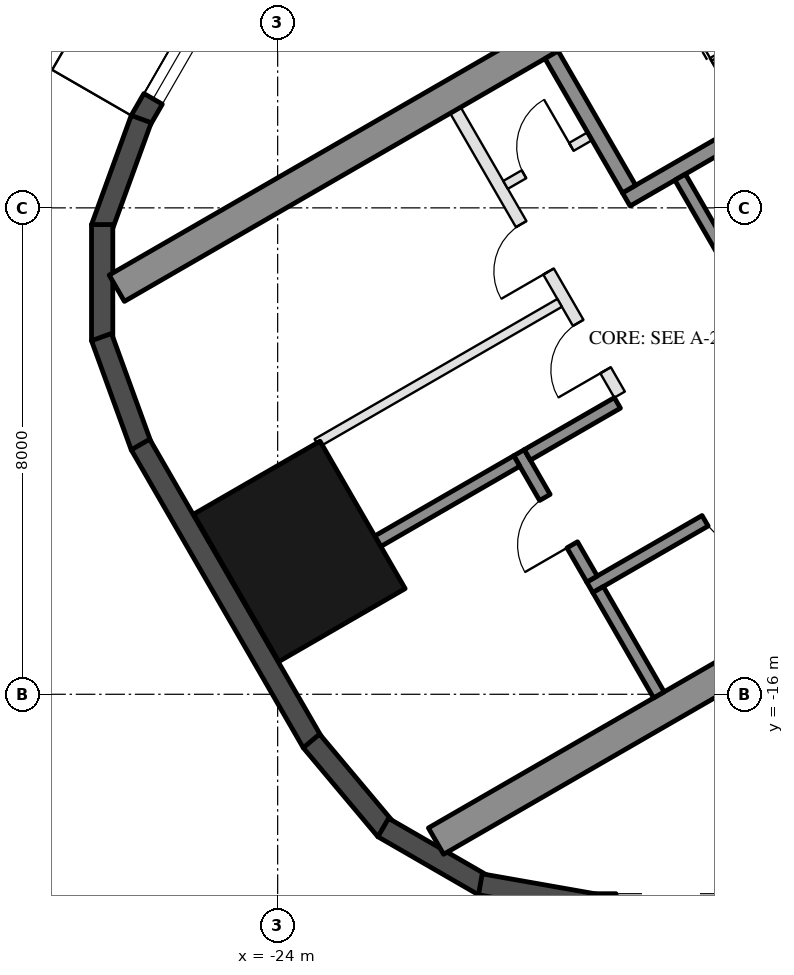
"""IFC4 building model, lengths in metres.
Left out: names, types, materials, properties, quantities, classifications, styles, units other than length and angle.
Written with IfcOpenShell. Run it as: python <this file> out.ifc"""

import sys

from ifc_helpers import new_model, si_unit, direction, frame, frame_2d, origin, origin_2d, place, context, subcontext, project, spatial, rectangle, hollow_rectangle, extrude, element, fill, save


model = new_model("IFC4")
c1 = context("Model", 3, precision=1e-05, world=origin(), true_north=direction((0.0, 1.0)))
c2 = subcontext(c1, "Body", "Model", "MODEL_VIEW")
j1 = project(units=[si_unit("LENGTHUNIT", "METRE"), si_unit("PLANEANGLEUNIT", "RADIAN")], contexts=[c1])
p1 = place(None, origin())
s1 = spatial("IfcSite", under=j1, at=p1, CompositionType="ELEMENT")
p2 = place(p1, origin())
s2 = spatial("IfcBuilding", under=s1, at=p2, CompositionType="ELEMENT")
p3 = place(p2, frame((0.0, 0.0, 87.2)))
s3 = spatial("IfcBuildingStorey", under=s2, at=p3, CompositionType="ELEMENT", Elevation=87.2)
p4 = place(p3, frame((-23.643, -13.65, 0.0), z_axis=(0.0, 0.0, 1.0), x_axis=(-0.5, 0.866025403784, 0.0)))
e1 = element("IfcColumn", 1, at=p4, inside=s3, PredefinedType="COLUMN", context=c2, shape_type="SweptSolid", body=[
    extrude(hollow_rectangle(XDim=2.8, YDim=2.4, WallThickness=0.07, at=origin_2d()), origin(), (0.0, 0.0, 1.0), 3.7),
])
p5 = place(p3, frame((-24.299, -3.176, 0.0), z_axis=(0.0, 0.0, 1.0), x_axis=(-0.500028278809, -0.866009076391, 0.0)))
e2 = element("IfcWall", 2, at=p5, inside=s3, PredefinedType="SOLIDWALL", context=c2, shape_type="SweptSolid", body=[
    extrude(rectangle(XDim=3.916, YDim=0.35, at=frame_2d((1.958, 0.0))), origin(), (0.0, 0.0, 1.0), 3.55),
])
p6 = place(p5, frame((1.7, 0.0, 0.3)))
e3 = element("IfcOpeningElement", 3, at=p6, cuts=e2, PredefinedType="OPENING", context=c2, shape_type="SweptSolid", body=[
    extrude(rectangle(XDim=1.8, YDim=2.65, at=frame_2d((0.9, 1.325))), frame((0.0, 0.185, 0.0), z_axis=(0.0, -1.0, 0.0), x_axis=(1.0, 0.0, 0.0)), (0.0, 0.0, 1.0), 0.37),
])
for number, where, z_axis, x_axis in (
    (4, (-26.244, -6.54, 0.0), (0.0, 0.0, 1.0), (-0.342, -0.94, 0.0)),
    (5, (-26.886, -8.275, 0.0), (0.0, 0.0, 1.0), (0.0, -1.0, 0.0)),
    (6, (-26.897, -10.125, 0.0), (0.0, 0.0, 1.0), (0.342, -0.94, 0.0)),
):
    element("IfcWall", number, at=place(p3, frame(where, z_axis=z_axis, x_axis=x_axis)), inside=s3, PredefinedType="SOLIDWALL", context=c2, shape_type="SweptSolid", body=[
        extrude(rectangle(XDim=1.91, YDim=0.35, at=frame_2d((0.955, 0.0))), origin(), (0.0, 0.0, 1.0), 3.55),
    ])
p7 = place(p3, frame((-26.257, -11.893, 0.0), z_axis=(0.0, 0.0, 1.0), x_axis=(0.500018773155, -0.866014564827, 0.0)))
e7 = element("IfcWall", 7, at=p7, inside=s3, PredefinedType="SOLIDWALL", context=c2, shape_type="SweptSolid", body=[
    extrude(rectangle(XDim=5.658, YDim=0.35, at=frame_2d((2.829, 0.0))), origin(), (0.0, 0.0, 1.0), 3.55),
])
for number, where, z_axis, x_axis in (
    (8, (-23.445, -16.768, 0.0), (0.0, 0.0, 1.0), (0.643, -0.766, 0.0)),
    (9, (-22.264, -18.192, 0.0), (0.0, 0.0, 1.0), (0.866, -0.5, 0.0)),
):
    element("IfcWall", number, at=place(p3, frame(where, z_axis=z_axis, x_axis=x_axis)), inside=s3, PredefinedType="SOLIDWALL", context=c2, shape_type="SweptSolid", body=[
        extrude(rectangle(XDim=1.91, YDim=0.35, at=frame_2d((0.955, 0.0))), origin(), (0.0, 0.0, 1.0), 3.55),
    ])
p8 = place(p3, frame((-20.667, -19.126, 0.0), z_axis=(0.0, 0.0, 1.0), x_axis=(0.984798995425, -0.173697837091, 0.0)))
e10 = element("IfcWall", 10, at=p8, inside=s3, PredefinedType="SOLIDWALL", context=c2, shape_type="SweptSolid", body=[
    extrude(rectangle(XDim=1.91, YDim=0.35, at=frame_2d((0.955, 0.0))), origin(), (0.0, 0.0, 1.0), 3.55),
])
p9 = place(p3, frame((-18.816, -19.455, 0.0), z_axis=(0.0, 0.0, 1.0), x_axis=(1.0, 0.0, 0.0)))
e11 = element("IfcWall", 11, at=p9, inside=s3, PredefinedType="SOLIDWALL", context=c2, shape_type="SweptSolid", body=[
    extrude(rectangle(XDim=11.816, YDim=0.35, at=frame_2d((5.908, 0.0))), origin(), (0.0, 0.0, 1.0), 3.55),
])
p10 = place(p9, frame((0.381, 0.0, 0.3)))
e12 = element("IfcOpeningElement", 12, at=p10, cuts=e11, PredefinedType="OPENING", context=c2, shape_type="SweptSolid", body=[
    extrude(rectangle(XDim=1.8, YDim=2.65, at=frame_2d((0.9, 1.325))), frame((0.0, 0.185, 0.0), z_axis=(0.0, -1.0, 0.0), x_axis=(1.0, 0.0, 0.0)), (0.0, 0.0, 1.0), 0.37),
])
p11 = place(p9, frame((7.716, 0.0, 0.0)))
e13 = element("IfcOpeningElement", 13, at=p11, cuts=e11, PredefinedType="OPENING", context=c2, shape_type="SweptSolid", body=[
    extrude(rectangle(XDim=2.4, YDim=2.4, at=frame_2d((1.2, 1.2))), frame((0.0, 0.185, 0.0), z_axis=(0.0, -1.0, 0.0), x_axis=(1.0, 0.0, 0.0)), (0.0, 0.0, 1.0), 0.37),
])
p12 = place(p9, frame((3.816, 0.0, 0.3)))
e14 = element("IfcOpeningElement", 14, at=p12, cuts=e11, PredefinedType="OPENING", context=c2, shape_type="SweptSolid", body=[
    extrude(rectangle(XDim=1.6, YDim=2.65, at=frame_2d((0.8, 1.325))), frame((0.0, 0.185, 0.0), z_axis=(0.0, -1.0, 0.0), x_axis=(1.0, 0.0, 0.0)), (0.0, 0.0, 1.0), 0.37),
])
p13 = place(p9, frame((5.716, 0.0, 0.3)))
e15 = element("IfcOpeningElement", 15, at=p13, cuts=e11, PredefinedType="OPENING", context=c2, shape_type="SweptSolid", body=[
    extrude(rectangle(XDim=1.6, YDim=2.65, at=frame_2d((0.8, 1.325))), frame((0.0, 0.185, 0.0), z_axis=(0.0, -1.0, 0.0), x_axis=(1.0, 0.0, 0.0)), (0.0, 0.0, 1.0), 0.37),
])
for number, where, z_axis, x_axis in (
    (16, (-13.797, -1.903, 0.0), (0.0, 0.0, 1.0), (-0.866, -0.5, 0.0)),
    (17, (-8.547, -10.997, 0.0), (0.0, 0.0, 1.0), (-0.866, -0.5, 0.0)),
):
    element("IfcWall", number, at=place(p3, frame(where, z_axis=z_axis, x_axis=x_axis)), inside=s3, PredefinedType="SHEAR", context=c2, shape_type="SweptSolid", body=[
        extrude(rectangle(XDim=14.837, YDim=0.5, at=frame_2d((7.418, 0.0))), origin(), (0.0, 0.0, 1.0), 3.5),
    ])
p14 = place(p3, frame((-12.681, -4.636, 0.0), z_axis=(0.0, 0.0, 1.0), x_axis=(-0.866021702275, -0.500006411147, 0.0)))
e18 = element("IfcWall", 18, at=p14, inside=s3, PredefinedType="SHEAR", context=c2, shape_type="SweptSolid", body=[
    extrude(rectangle(XDim=6.45, YDim=0.25, at=frame_2d((3.225, 0.0))), origin(), (0.0, 0.0, 1.0), 3.5),
])
p15 = place(p14, frame((0.3, 0.0, 0.0)))
e19 = element("IfcOpeningElement", 19, at=p15, cuts=e18, PredefinedType="OPENING", context=c2, shape_type="SweptSolid", body=[
    extrude(rectangle(XDim=1.0, YDim=2.1, at=frame_2d((0.5, 1.05))), frame((0.0, 0.135, 0.0), z_axis=(0.0, -1.0, 0.0), x_axis=(1.0, 0.0, 0.0)), (0.0, 0.0, 1.0), 0.27),
])
p16 = place(p3, frame((-19.496, -5.482, 0.0), z_axis=(0.0, 0.0, 1.0), x_axis=(0.499990435942, -0.866030925526, 0.0)))
e20 = element("IfcWall", 20, at=p16, inside=s3, PredefinedType="SHEAR", context=c2, shape_type="SweptSolid", body=[
    extrude(rectangle(XDim=2.55, YDim=0.25, at=frame_2d((1.275, 0.0))), origin(), (0.0, 0.0, 1.0), 3.5),
])
p17 = place(p3, frame((-17.381, -7.495, 0.0), z_axis=(0.0, 0.0, 1.0), x_axis=(0.500011755427, -0.866018616679, 0.0)))
e21 = element("IfcWall", 21, at=p17, inside=s3, PredefinedType="SHEAR", context=c2, shape_type="SweptSolid", body=[
    extrude(rectangle(XDim=2.8, YDim=0.2, at=frame_2d((1.4, 0.0))), origin(), (0.0, 0.0, 1.0), 3.5),
])
p18 = place(p3, frame((-10.068, -9.162, 0.0), z_axis=(0.0, 0.0, 1.0), x_axis=(-0.866032725843, -0.499987317609, 0.0)))
e22 = element("IfcWall", 22, at=p18, inside=s3, PredefinedType="SHEAR", context=c2, shape_type="SweptSolid", body=[
    extrude(rectangle(XDim=10.16, YDim=0.2, at=frame_2d((5.08, 0.0))), origin(), (0.0, 0.0, 1.0), 3.5),
])
p19 = place(p18, frame((1.99, 0.0, 0.0)))
e23 = element("IfcOpeningElement", 23, at=p19, cuts=e22, PredefinedType="OPENING", context=c2, shape_type="SweptSolid", body=[
    extrude(rectangle(XDim=0.9, YDim=2.1, at=frame_2d((0.45, 1.05))), frame((0.0, 0.11, 0.0), z_axis=(0.0, -1.0, 0.0), x_axis=(1.0, 0.0, 0.0)), (0.0, 0.0, 1.0), 0.22),
])
p20 = place(p18, frame((7.07, 0.0, 0.0)))
e24 = element("IfcOpeningElement", 24, at=p20, cuts=e22, PredefinedType="OPENING", context=c2, shape_type="SweptSolid", body=[
    extrude(rectangle(XDim=0.9, YDim=2.1, at=frame_2d((0.45, 1.05))), frame((0.0, 0.11, 0.0), z_axis=(0.0, -1.0, 0.0), x_axis=(1.0, 0.0, 0.0)), (0.0, 0.0, 1.0), 0.22),
])
p21 = place(p3, frame((-20.031, -12.026, 0.0), z_axis=(0.0, 0.0, 1.0), x_axis=(0.500033551112, -0.866006032174, 0.0)))
e25 = element("IfcWall", 25, at=p21, inside=s3, PredefinedType="SHEAR", context=c2, shape_type="SweptSolid", body=[
    extrude(rectangle(XDim=2.4, YDim=0.2, at=frame_2d((1.2, 0.0))), origin(), (0.0, 0.0, 1.0), 3.5),
])
p22 = place(p21, frame((0.85, 0.0, 0.0)))
e26 = element("IfcOpeningElement", 26, at=p22, cuts=e25, PredefinedType="OPENING", context=c2, shape_type="SweptSolid", body=[
    extrude(rectangle(XDim=0.9, YDim=2.1, at=frame_2d((0.45, 1.05))), frame((0.0, 0.11, 0.0), z_axis=(0.0, -1.0, 0.0), x_axis=(1.0, 0.0, 0.0)), (0.0, 0.0, 1.0), 0.22),
])
p23 = place(p3, frame((-18.413, -11.208, 0.0), z_axis=(0.0, 0.0, 1.0), x_axis=(-0.866038183914, -0.499977863513, 0.0)))
e27 = element("IfcWall", 27, at=p23, inside=s3, PredefinedType="SHEAR", context=c2, shape_type="SweptSolid", body=[
    extrude(rectangle(XDim=1.71, YDim=0.2, at=frame_2d((0.855, 0.0))), origin(), (0.0, 0.0, 1.0), 3.5),
])
p24 = place(p3, frame((-18.73, -14.278, 0.0), z_axis=(0.0, 0.0, 1.0), x_axis=(0.50002537861, -0.866010750942, 0.0)))
e28 = element("IfcWall", 28, at=p24, inside=s3, PredefinedType="SHEAR", context=c2, shape_type="SweptSolid", body=[
    extrude(rectangle(XDim=2.0, YDim=0.2, at=frame_2d((1.0, 0.0))), origin(), (0.0, 0.0, 1.0), 3.5),
])
p25 = place(p3, frame((-20.067, -12.163, 0.0), z_axis=(0.0, 0.0, 1.0), x_axis=(-0.866060851709, -0.499938597367, 0.0)))
e29 = element("IfcWall", 29, at=p25, inside=s3, PredefinedType="SHEAR", context=c2, shape_type="SweptSolid", body=[
    extrude(rectangle(XDim=2.64, YDim=0.2, at=frame_2d((1.32, 0.0))), origin(), (0.0, 0.0, 1.0), 3.5),
])
p26 = place(p3, frame((-21.076, -6.395, 0.0), z_axis=(0.0, 0.0, 1.0), x_axis=(0.50001468107, -0.866016927499, 0.0)))
e30 = element("IfcWall", 30, at=p26, inside=s3, PredefinedType="PARTITIONING", context=c2, shape_type="SweptSolid", body=[
    extrude(rectangle(XDim=5.4, YDim=0.2, at=frame_2d((2.7, 0.0))), origin(), (0.0, 0.0, 1.0), 3.5),
])
p27 = place(p26, frame((2.163, 0.0, 0.0)))
e31 = element("IfcOpeningElement", 31, at=p27, cuts=e30, PredefinedType="OPENING", context=c2, shape_type="SweptSolid", body=[
    extrude(rectangle(XDim=0.9, YDim=2.1, at=frame_2d((0.45, 1.05))), frame((0.0, 0.11, 0.0), z_axis=(0.0, -1.0, 0.0), x_axis=(1.0, 0.0, 0.0)), (0.0, 0.0, 1.0), 0.22),
])
p28 = place(p26, frame((4.038, 0.0, 0.0)))
e32 = element("IfcOpeningElement", 32, at=p28, cuts=e30, PredefinedType="OPENING", context=c2, shape_type="SweptSolid", body=[
    extrude(rectangle(XDim=0.9, YDim=2.1, at=frame_2d((0.45, 1.05))), frame((0.0, 0.11, 0.0), z_axis=(0.0, -1.0, 0.0), x_axis=(1.0, 0.0, 0.0)), (0.0, 0.0, 1.0), 0.22),
])
p29 = place(p3, frame((-18.866, -6.822, 0.0), z_axis=(0.0, 0.0, 1.0), x_axis=(-0.866028054938, -0.499995408039, 0.0)))
e33 = element("IfcWall", 33, at=p29, inside=s3, PredefinedType="PARTITIONING", context=c2, shape_type="SweptSolid", body=[
    extrude(rectangle(XDim=1.6, YDim=0.15, at=frame_2d((0.8, 0.0))), origin(), (0.0, 0.0, 1.0), 3.5),
])
p30 = place(p29, frame((0.35, 0.0, 0.0)))
e34 = element("IfcOpeningElement", 34, at=p30, cuts=e33, PredefinedType="OPENING", context=c2, shape_type="SweptSolid", body=[
    extrude(rectangle(XDim=0.9, YDim=2.1, at=frame_2d((0.45, 1.05))), frame((0.0, 0.085, 0.0), z_axis=(0.0, -1.0, 0.0), x_axis=(1.0, 0.0, 0.0)), (0.0, 0.0, 1.0), 0.17),
])
p31 = place(p3, frame((-19.363, -9.562, 0.0), z_axis=(0.0, 0.0, 1.0), x_axis=(-0.86601185002, -0.500023475074, 0.0)))
e35 = element("IfcWall", 35, at=p31, inside=s3, PredefinedType="PARTITIONING", context=c2, shape_type="SweptSolid", body=[
    extrude(rectangle(XDim=4.61, YDim=0.15, at=frame_2d((2.305, 0.0))), origin(), (0.0, 0.0, 1.0), 3.5),
])
p32 = place(p6, origin())
e36 = element("IfcWindow", 36, at=p32, inside=s3, PartitioningType="SINGLE_PANEL", PredefinedType="WINDOW", context=c2, shape_type="SweptSolid", body=[
    extrude(rectangle(XDim=1.8, YDim=2.65, at=frame_2d((0.9, 1.325))), frame((0.0, 0.03, 0.0), z_axis=(0.0, -1.0, 0.0), x_axis=(1.0, 0.0, 0.0)), (0.0, 0.0, 1.0), 0.06),
])
fill(e3, e36)
p33 = place(p30, frame((0.9, 0.0, 0.0), z_axis=(0.0, 0.0, 1.0), x_axis=(-1.0, 0.0, 0.0)))
e37 = element("IfcDoor", 37, at=p33, inside=s3, OperationType="SINGLE_SWING_RIGHT", PredefinedType="DOOR", context=c2, shape_type="SweptSolid", body=[
    extrude(rectangle(XDim=0.9, YDim=2.1, at=frame_2d((0.45, 1.05))), frame((0.0, 0.025, 0.0), z_axis=(0.0, -1.0, 0.0), x_axis=(1.0, 0.0, 0.0)), (0.0, 0.0, 1.0), 0.05),
])
fill(e34, e37)
p34 = place(p20, origin())
e38 = element("IfcDoor", 38, at=p34, inside=s3, OperationType="SINGLE_SWING_LEFT", PredefinedType="DOOR", context=c2, shape_type="SweptSolid", body=[
    extrude(rectangle(XDim=0.9, YDim=2.1, at=frame_2d((0.45, 1.05))), frame((0.0, 0.025, 0.0), z_axis=(0.0, -1.0, 0.0), x_axis=(1.0, 0.0, 0.0)), (0.0, 0.0, 1.0), 0.05),
])
fill(e24, e38)
p35 = place(p22, frame((0.9, 0.0, 0.0), z_axis=(0.0, 0.0, 1.0), x_axis=(-1.0, 0.0, 0.0)))
e39 = element("IfcDoor", 39, at=p35, inside=s3, OperationType="SINGLE_SWING_LEFT", PredefinedType="DOOR", context=c2, shape_type="SweptSolid", body=[
    extrude(rectangle(XDim=0.9, YDim=2.1, at=frame_2d((0.45, 1.05))), frame((0.0, 0.025, 0.0), z_axis=(0.0, -1.0, 0.0), x_axis=(1.0, 0.0, 0.0)), (0.0, 0.0, 1.0), 0.05),
])
fill(e26, e39)
p36 = place(p27, frame((0.9, 0.0, 0.0), z_axis=(0.0, 0.0, 1.0), x_axis=(-1.0, 0.0, 0.0)))
e40 = element("IfcDoor", 40, at=p36, inside=s3, OperationType="SINGLE_SWING_LEFT", PredefinedType="DOOR", context=c2, shape_type="SweptSolid", body=[
    extrude(rectangle(XDim=0.9, YDim=2.1, at=frame_2d((0.45, 1.05))), frame((0.0, 0.025, 0.0), z_axis=(0.0, -1.0, 0.0), x_axis=(1.0, 0.0, 0.0)), (0.0, 0.0, 1.0), 0.05),
])
fill(e31, e40)
p37 = place(p28, frame((0.9, 0.0, 0.0), z_axis=(0.0, 0.0, 1.0), x_axis=(-1.0, 0.0, 0.0)))
e41 = element("IfcDoor", 41, at=p37, inside=s3, OperationType="SINGLE_SWING_LEFT", PredefinedType="DOOR", context=c2, shape_type="SweptSolid", body=[
    extrude(rectangle(XDim=0.9, YDim=2.1, at=frame_2d((0.45, 1.05))), frame((0.0, 0.025, 0.0), z_axis=(0.0, -1.0, 0.0), x_axis=(1.0, 0.0, 0.0)), (0.0, 0.0, 1.0), 0.05),
])
fill(e32, e41)
save(model, sys.argv[1])
